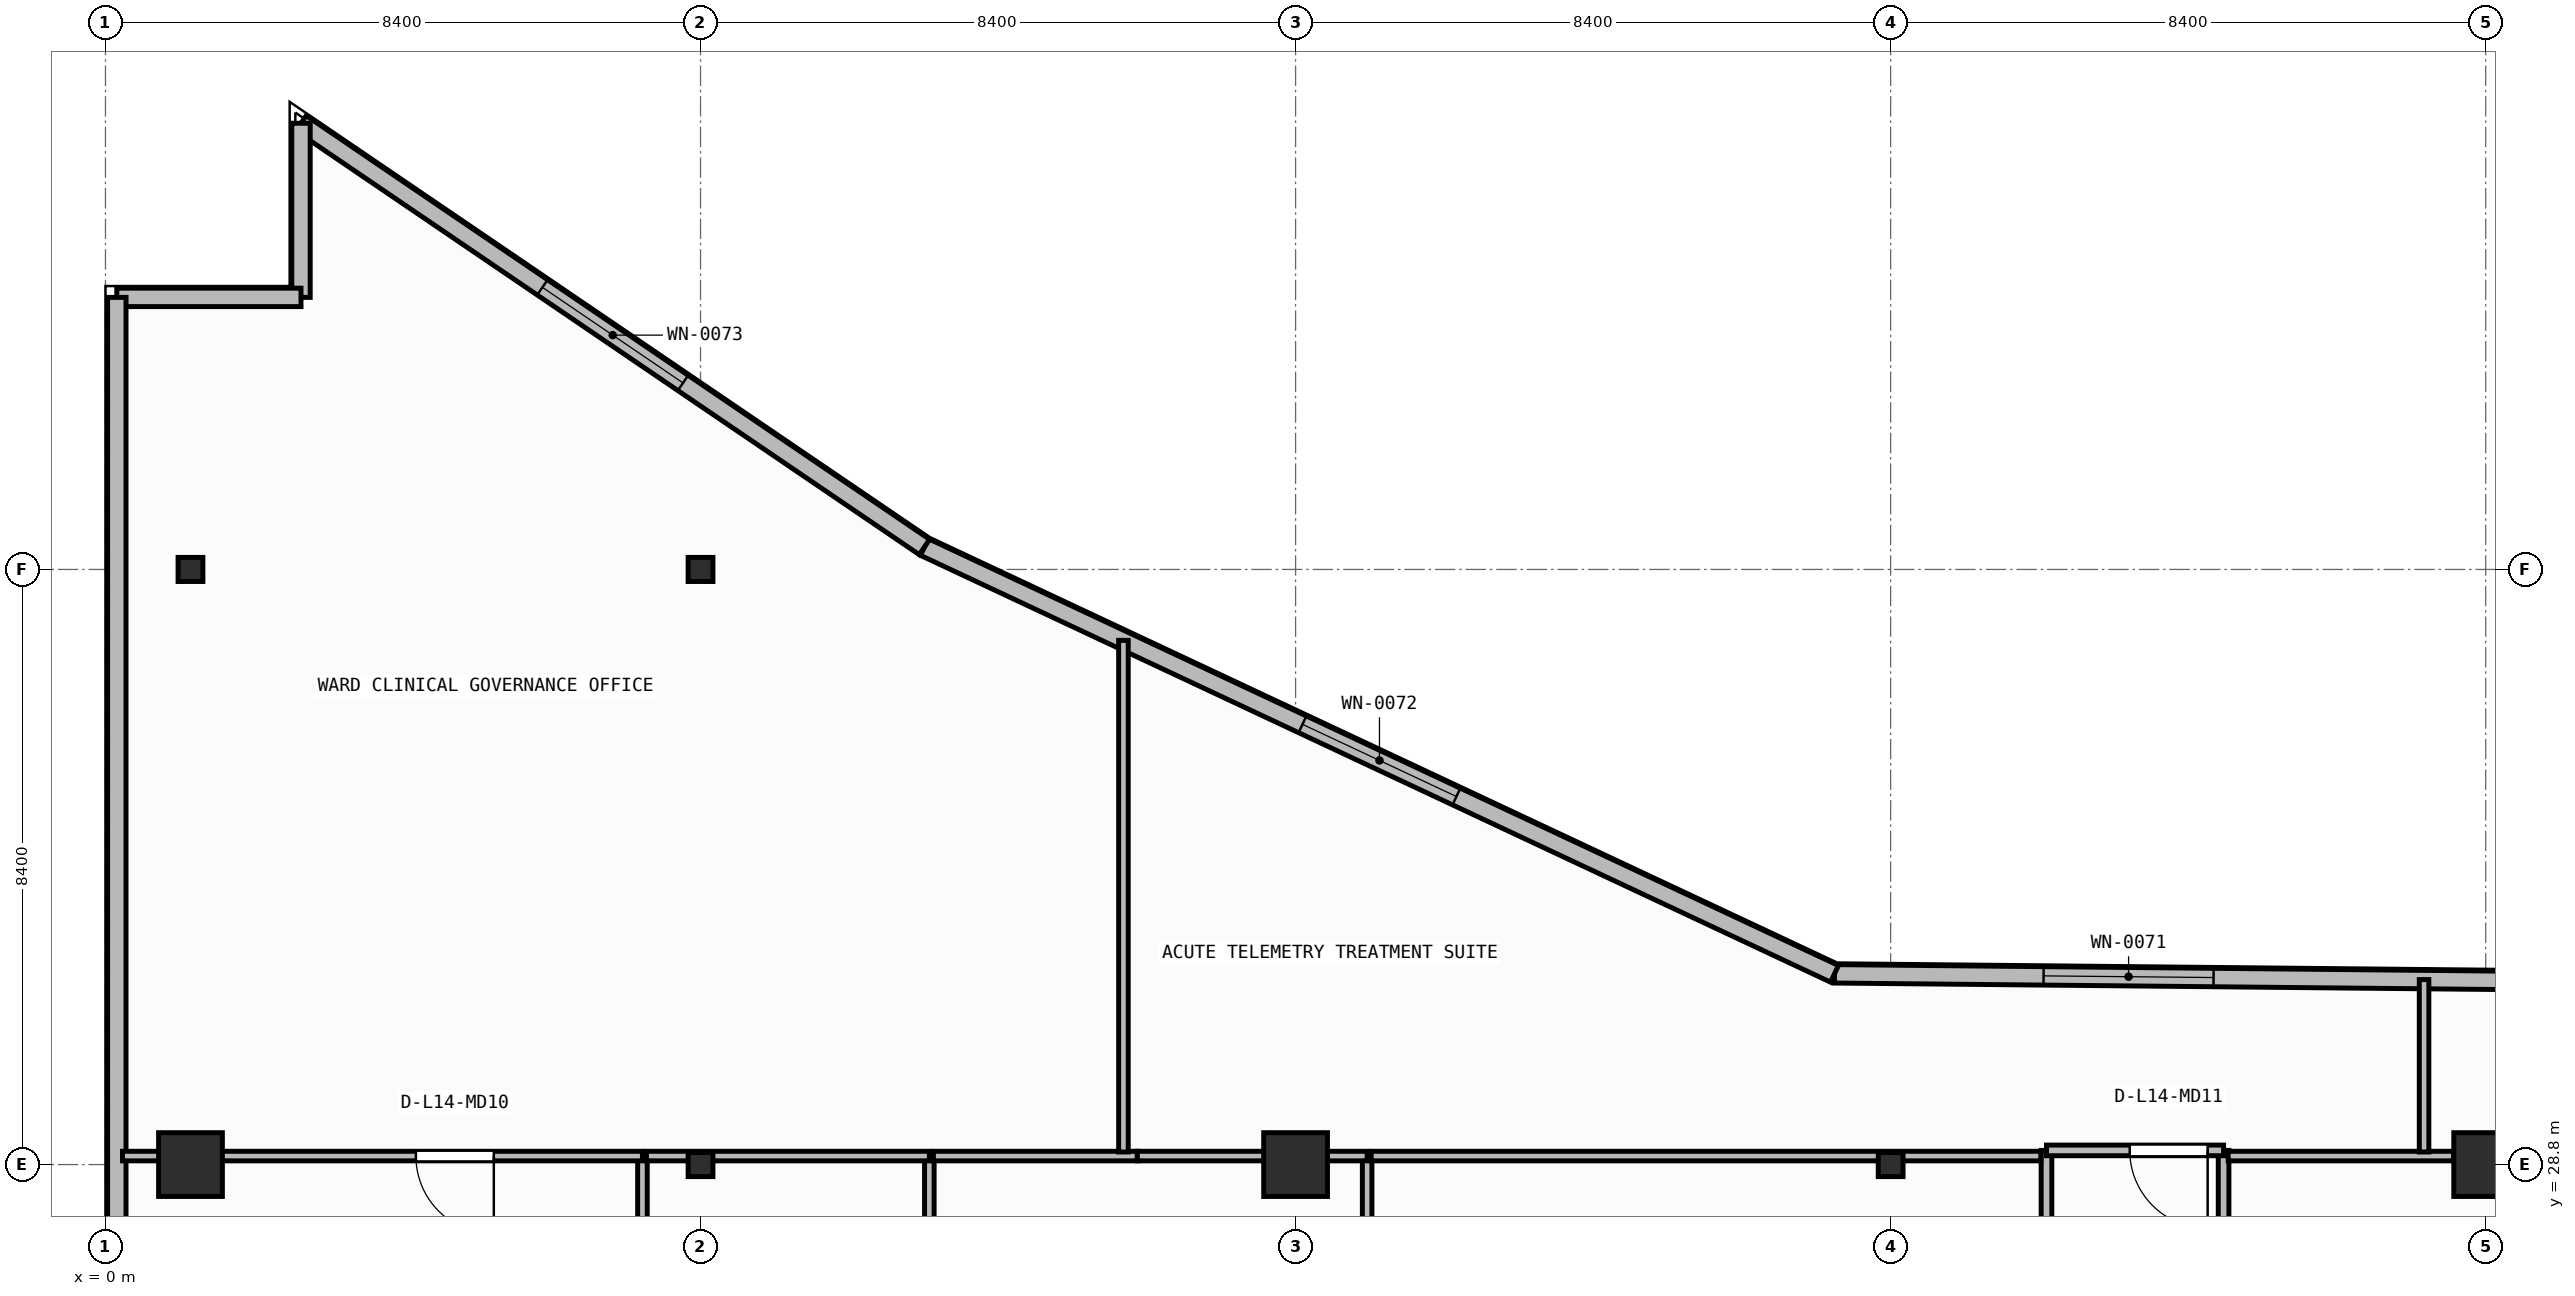
"""IFC4 building model, lengths in metres.
Left out: names, types, materials, properties, quantities, classifications, styles, units other than length and angle.
Written with IfcOpenShell. Run it as: python <this file> out.ifc"""

import sys

from ifc_helpers import new_model, si_unit, direction, frame, frame_2d, origin, origin_2d, place, context, subcontext, project, spatial, rectangle, i_section, extrude, element, fill, save


model = new_model("IFC4")
c1 = context("Model", 3, precision=1e-05, world=origin(), true_north=direction((0.0, 1.0)))
c2 = subcontext(c1, "Body", "Model", "MODEL_VIEW")
j1 = project(units=[si_unit("LENGTHUNIT", "METRE"), si_unit("PLANEANGLEUNIT", "RADIAN")], contexts=[c1])
p1 = place(None, origin())
s1 = spatial("IfcSite", under=j1, at=p1, CompositionType="ELEMENT")
p2 = place(p1, origin())
s2 = spatial("IfcBuilding", under=s1, at=p2, CompositionType="ELEMENT")
p3 = place(p2, frame((0.0, 0.0, 58.05)))
s3 = spatial("IfcBuildingStorey", under=s2, at=p3, CompositionType="ELEMENT", Elevation=58.05)
p4 = place(p3, frame((1.2, 28.8, 0.0), z_axis=(0.0, 0.0, 1.0), x_axis=(1.0, 0.0, 0.0)))
e1 = element("IfcColumn", 1, at=p4, inside=s3, PredefinedType="COLUMN", context=c2, shape_type="SweptSolid", body=[
    extrude(rectangle(XDim=0.9, YDim=0.9, at=origin_2d()), origin(), (0.0, 0.0, 1.0), 3.95),
])
p5 = place(p3, frame((8.4, 28.8, 0.0), z_axis=(0.0, 0.0, 1.0), x_axis=(1.0, 0.0, 0.0)))
e2 = element("IfcColumn", 2, at=p5, inside=s3, PredefinedType="COLUMN", context=c2, shape_type="SweptSolid", body=[
    extrude(i_section(OverallWidth=0.35, OverallDepth=0.34, WebThickness=0.016, FlangeThickness=0.028, at=origin_2d()), origin(), (0.0, 0.0, 1.0), 3.95),
])
p6 = place(p3, frame((16.8, 28.8, 0.0), z_axis=(0.0, 0.0, 1.0), x_axis=(1.0, 0.0, 0.0)))
e3 = element("IfcColumn", 3, at=p6, inside=s3, PredefinedType="COLUMN", context=c2, shape_type="SweptSolid", body=[
    extrude(rectangle(XDim=0.9, YDim=0.9, at=origin_2d()), origin(), (0.0, 0.0, 1.0), 3.95),
])
p7 = place(p3, frame((25.2, 28.8, 0.0), z_axis=(0.0, 0.0, 1.0), x_axis=(1.0, 0.0, 0.0)))
e4 = element("IfcColumn", 4, at=p7, inside=s3, PredefinedType="COLUMN", context=c2, shape_type="SweptSolid", body=[
    extrude(i_section(OverallWidth=0.35, OverallDepth=0.34, WebThickness=0.016, FlangeThickness=0.028, at=origin_2d()), origin(), (0.0, 0.0, 1.0), 3.95),
])
p8 = place(p3, frame((33.6, 28.8, 0.0), z_axis=(0.0, 0.0, 1.0), x_axis=(1.0, 0.0, 0.0)))
e5 = element("IfcColumn", 5, at=p8, inside=s3, PredefinedType="COLUMN", context=c2, shape_type="SweptSolid", body=[
    extrude(rectangle(XDim=0.9, YDim=0.9, at=origin_2d()), origin(), (0.0, 0.0, 1.0), 3.95),
])
for number, where, z_axis, x_axis in (
    (6, (1.2, 37.2, 0.0), (0.0, 0.0, 1.0), (1.0, 0.0, 0.0)),
    (7, (8.4, 37.2, 0.0), (0.0, 0.0, 1.0), (1.0, 0.0, 0.0)),
):
    element("IfcColumn", number, at=place(p3, frame(where, z_axis=z_axis, x_axis=x_axis)), inside=s3, PredefinedType="COLUMN", context=c2, shape_type="SweptSolid", body=[
        extrude(i_section(OverallWidth=0.35, OverallDepth=0.34, WebThickness=0.016, FlangeThickness=0.028, at=origin_2d()), origin(), (0.0, 0.0, 1.0), 3.95),
    ])
p9 = place(p3, frame((39.59, 31.344, 0.0), z_axis=(0.0, 0.0, 1.0), x_axis=(-0.999952362926, 0.009760731435, 0.0)))
e8 = element("IfcWall", 8, at=p9, inside=s3, PredefinedType="STANDARD", context=c2, shape_type="SweptSolid", body=[
    extrude(rectangle(XDim=15.183, YDim=0.26, at=frame_2d((7.591, 0.0))), origin(), (0.0, 0.0, 1.0), 3.71),
])
p10 = place(p9, frame((9.831, 0.0, 0.9)))
e9 = element("IfcOpeningElement", 9, at=p10, cuts=e8, PredefinedType="OPENING", context=c2, shape_type="SweptSolid", body=[
    extrude(rectangle(XDim=2.4, YDim=1.65, at=frame_2d((1.2, 0.825))), frame((0.0, 0.14, 0.0), z_axis=(0.0, -1.0, 0.0), x_axis=(1.0, 0.0, 0.0)), (0.0, 0.0, 1.0), 0.28),
])
p11 = place(p3, frame((24.408, 31.492, 0.0), z_axis=(0.0, 0.0, 1.0), x_axis=(-0.905396522918, 0.424566998585, 0.0)))
e10 = element("IfcWall", 10, at=p11, inside=s3, PredefinedType="STANDARD", context=c2, shape_type="SweptSolid", body=[
    extrude(rectangle(XDim=14.189, YDim=0.26, at=frame_2d((7.095, 0.0))), origin(), (0.0, 0.0, 1.0), 3.71),
])
p12 = place(p11, frame((5.895, 0.0, 0.9)))
e11 = element("IfcOpeningElement", 11, at=p12, cuts=e10, PredefinedType="OPENING", context=c2, shape_type="SweptSolid", body=[
    extrude(rectangle(XDim=2.4, YDim=1.65, at=frame_2d((1.2, 0.825))), frame((0.0, 0.14, 0.0), z_axis=(0.0, -1.0, 0.0), x_axis=(1.0, 0.0, 0.0)), (0.0, 0.0, 1.0), 0.28),
])
p13 = place(p3, frame((11.561, 37.517, 0.0), z_axis=(0.0, 0.0, 1.0), x_axis=(-0.827064743936, 0.562106670782, 0.0)))
e12 = element("IfcWall", 12, at=p13, inside=s3, PredefinedType="STANDARD", context=c2, shape_type="SweptSolid", body=[
    extrude(rectangle(XDim=10.641, YDim=0.26, at=frame_2d((5.32, 0.0))), origin(), (0.0, 0.0, 1.0), 3.71),
])
p14 = place(p13, frame((4.12, 0.0, 0.9)))
e13 = element("IfcOpeningElement", 13, at=p14, cuts=e12, PredefinedType="OPENING", context=c2, shape_type="SweptSolid", body=[
    extrude(rectangle(XDim=2.4, YDim=1.65, at=frame_2d((1.2, 0.825))), frame((0.0, 0.14, 0.0), z_axis=(0.0, -1.0, 0.0), x_axis=(1.0, 0.0, 0.0)), (0.0, 0.0, 1.0), 0.28),
])
p15 = place(p3, frame((2.76, 43.498, 0.0), z_axis=(0.0, 0.0, 1.0), x_axis=(0.0, -1.0, 0.0)))
e14 = element("IfcWall", 14, at=p15, inside=s3, PredefinedType="STANDARD", context=c2, shape_type="SweptSolid", body=[
    extrude(rectangle(XDim=2.458, YDim=0.26, at=frame_2d((1.229, 0.0))), origin(), (0.0, 0.0, 1.0), 3.71),
])
p16 = place(p3, frame((2.76, 41.04, 0.0), z_axis=(0.0, 0.0, 1.0), x_axis=(-1.0, 0.0, 0.0)))
e15 = element("IfcWall", 15, at=p16, inside=s3, PredefinedType="STANDARD", context=c2, shape_type="SweptSolid", body=[
    extrude(rectangle(XDim=2.6, YDim=0.26, at=frame_2d((1.3, 0.0))), origin(), (0.0, 0.0, 1.0), 3.71),
])
p17 = place(p3, frame((0.16, 41.04, 0.0), z_axis=(0.0, 0.0, 1.0), x_axis=(0.0, -1.0, 0.0)))
e16 = element("IfcWall", 16, at=p17, inside=s3, PredefinedType="STANDARD", context=c2, shape_type="SweptSolid", body=[
    extrude(rectangle(XDim=38.28, YDim=0.26, at=frame_2d((19.14, 0.0))), origin(), (0.0, 0.0, 1.0), 3.71),
])
p18 = place(p17, frame((30.187, 0.0, 0.0)))
e17 = element("IfcOpeningElement", 17, at=p18, cuts=e16, PredefinedType="OPENING", context=c2, shape_type="SweptSolid", body=[
    extrude(rectangle(XDim=1.3, YDim=2.15, at=frame_2d((0.65, 1.075))), frame((0.0, 0.14, 0.0), z_axis=(0.0, -1.0, 0.0), x_axis=(1.0, 0.0, 0.0)), (0.0, 0.0, 1.0), 0.28),
])
p19 = place(p17, frame((22.869, 0.0, 0.9)))
e18 = element("IfcOpeningElement", 18, at=p19, cuts=e16, PredefinedType="OPENING", context=c2, shape_type="SweptSolid", body=[
    extrude(rectangle(XDim=2.4, YDim=1.65, at=frame_2d((1.2, 0.825))), frame((0.0, 0.14, 0.0), z_axis=(0.0, -1.0, 0.0), x_axis=(1.0, 0.0, 0.0)), (0.0, 0.0, 1.0), 0.28),
])
p20 = place(p3, frame((27.4, 29.0, 0.0), z_axis=(0.0, 0.0, 1.0), x_axis=(0.0, -1.0, 0.0)))
e19 = element("IfcWall", 19, at=p20, inside=s3, PredefinedType="PARTITIONING", context=c2, shape_type="SweptSolid", body=[
    extrude(rectangle(XDim=9.432, YDim=0.15, at=frame_2d((4.716, 0.0))), origin(), (0.0, 0.0, 1.0), 3.71),
])
p21 = place(p20, frame((3.769, 0.0, 0.0)))
e20 = element("IfcOpeningElement", 20, at=p21, cuts=e19, PredefinedType="OPENING", context=c2, shape_type="SweptSolid", body=[
    extrude(rectangle(XDim=1.1, YDim=2.1, at=frame_2d((0.55, 1.05))), frame((0.0, 0.085, 0.0), z_axis=(0.0, -1.0, 0.0), x_axis=(1.0, 0.0, 0.0)), (0.0, 0.0, 1.0), 0.17),
])
p22 = place(p3, frame((29.9, 19.568, 0.0), z_axis=(0.0, 0.0, 1.0), x_axis=(0.0, 1.0, 0.0)))
e21 = element("IfcWall", 21, at=p22, inside=s3, PredefinedType="PARTITIONING", context=c2, shape_type="SweptSolid", body=[
    extrude(rectangle(XDim=9.432, YDim=0.15, at=frame_2d((4.716, 0.0))), origin(), (0.0, 0.0, 1.0), 3.71),
])
p23 = place(p22, frame((4.166, 0.0, 0.0)))
e22 = element("IfcOpeningElement", 22, at=p23, cuts=e21, PredefinedType="OPENING", context=c2, shape_type="SweptSolid", body=[
    extrude(rectangle(XDim=1.1, YDim=2.1, at=frame_2d((0.55, 1.05))), frame((0.0, 0.085, 0.0), z_axis=(0.0, -1.0, 0.0), x_axis=(1.0, 0.0, 0.0)), (0.0, 0.0, 1.0), 0.17),
])
p24 = place(p3, frame((29.9, 29.0, 0.0), z_axis=(0.0, 0.0, 1.0), x_axis=(-1.0, 0.0, 0.0)))
e23 = element("IfcWall", 23, at=p24, inside=s3, PredefinedType="PARTITIONING", context=c2, shape_type="SweptSolid", body=[
    extrude(rectangle(XDim=2.5, YDim=0.15, at=frame_2d((1.25, 0.0))), origin(), (0.0, 0.0, 1.0), 3.279),
])
p25 = place(p24, frame((0.225, 0.0, 0.0)))
e24 = element("IfcOpeningElement", 24, at=p25, cuts=e23, PredefinedType="OPENING", context=c2, shape_type="SweptSolid", body=[
    extrude(rectangle(XDim=1.1, YDim=2.1, at=frame_2d((0.55, 1.05))), frame((0.0, 0.085, 0.0), z_axis=(0.0, -1.0, 0.0), x_axis=(1.0, 0.0, 0.0)), (0.0, 0.0, 1.0), 0.17),
])
p26 = place(p3, frame((7.58, 19.397, 0.0), z_axis=(0.0, 0.0, 1.0), x_axis=(0.0, 1.0, 0.0)))
e25 = element("IfcWall", 25, at=p26, inside=s3, PredefinedType="PARTITIONING", context=c2, shape_type="SweptSolid", body=[
    extrude(rectangle(XDim=9.522, YDim=0.135, at=frame_2d((4.761, 0.0))), origin(), (0.0, 0.0, 1.0), 3.71),
])
p27 = place(p26, frame((4.612, 0.0, 0.0)))
e26 = element("IfcOpeningElement", 26, at=p27, cuts=e25, PredefinedType="OPENING", context=c2, shape_type="SweptSolid", body=[
    extrude(rectangle(XDim=1.1, YDim=2.1, at=frame_2d((0.55, 1.05))), frame((0.0, 0.077, 0.0), z_axis=(0.0, -1.0, 0.0), x_axis=(1.0, 0.0, 0.0)), (0.0, 0.0, 1.0), 0.155),
])
p28 = place(p3, frame((7.58, 28.92, 0.0), z_axis=(0.0, 0.0, 1.0), x_axis=(-1.0, 0.0, 0.0)))
e27 = element("IfcWall", 27, at=p28, inside=s3, PredefinedType="PARTITIONING", context=c2, shape_type="SweptSolid", body=[
    extrude(rectangle(XDim=7.34, YDim=0.135, at=frame_2d((3.67, 0.0))), origin(), (0.0, 0.0, 1.0), 3.073),
])
p29 = place(p28, frame((2.098, 0.0, 0.0)))
e28 = element("IfcOpeningElement", 28, at=p29, cuts=e27, PredefinedType="OPENING", context=c2, shape_type="SweptSolid", body=[
    extrude(rectangle(XDim=1.1, YDim=2.1, at=frame_2d((0.55, 1.05))), frame((0.0, 0.077, 0.0), z_axis=(0.0, -1.0, 0.0), x_axis=(1.0, 0.0, 0.0)), (0.0, 0.0, 1.0), 0.155),
])
p30 = place(p3, frame((11.63, 19.397, 0.0), z_axis=(0.0, 0.0, 1.0), x_axis=(0.0, 1.0, 0.0)))
e29 = element("IfcWall", 29, at=p30, inside=s3, PredefinedType="PARTITIONING", context=c2, shape_type="SweptSolid", body=[
    extrude(rectangle(XDim=9.522, YDim=0.135, at=frame_2d((4.761, 0.0))), origin(), (0.0, 0.0, 1.0), 3.71),
])
p31 = place(p3, frame((11.63, 28.92, 0.0), z_axis=(0.0, 0.0, 1.0), x_axis=(-1.0, 0.0, 0.0)))
e30 = element("IfcWall", 30, at=p31, inside=s3, PredefinedType="PARTITIONING", context=c2, shape_type="SweptSolid", body=[
    extrude(rectangle(XDim=3.992, YDim=0.135, at=frame_2d((1.996, 0.0))), origin(), (0.0, 0.0, 1.0), 3.073),
])
p32 = place(p3, frame((17.81, 19.397, 0.0), z_axis=(0.0, 0.0, 1.0), x_axis=(0.0, 1.0, 0.0)))
e31 = element("IfcWall", 31, at=p32, inside=s3, PredefinedType="PARTITIONING", context=c2, shape_type="SweptSolid", body=[
    extrude(rectangle(XDim=9.522, YDim=0.135, at=frame_2d((4.761, 0.0))), origin(), (0.0, 0.0, 1.0), 3.71),
])
p33 = place(p3, frame((14.565, 28.92, 0.0), z_axis=(0.0, 0.0, 1.0), x_axis=(-1.0, 0.0, 0.0)))
e32 = element("IfcWall", 32, at=p33, inside=s3, PredefinedType="PARTITIONING", context=c2, shape_type="SweptSolid", body=[
    extrude(rectangle(XDim=2.877, YDim=0.135, at=frame_2d((1.438, 0.0))), origin(), (0.0, 0.0, 1.0), 3.073),
])
p34 = place(p3, frame((17.81, 28.92, 0.0), z_axis=(0.0, 0.0, 1.0), x_axis=(-1.0, 0.0, 0.0)))
e33 = element("IfcWall", 33, at=p34, inside=s3, PredefinedType="PARTITIONING", context=c2, shape_type="SweptSolid", body=[
    extrude(rectangle(XDim=3.243, YDim=0.135, at=frame_2d((1.622, 0.0))), origin(), (0.0, 0.0, 1.0), 3.073),
])
p35 = place(p3, frame((27.32, 28.92, 0.0), z_axis=(0.0, 0.0, 1.0), x_axis=(-1.0, 0.0, 0.0)))
e34 = element("IfcWall", 34, at=p35, inside=s3, PredefinedType="PARTITIONING", context=c2, shape_type="SweptSolid", body=[
    extrude(rectangle(XDim=9.453, YDim=0.135, at=frame_2d((4.726, 0.0))), origin(), (0.0, 0.0, 1.0), 3.073),
])
p36 = place(p3, frame((33.15, 28.92, 0.0), z_axis=(0.0, 0.0, 1.0), x_axis=(-1.0, 0.0, 0.0)))
e35 = element("IfcWall", 35, at=p36, inside=s3, PredefinedType="PARTITIONING", context=c2, shape_type="SweptSolid", body=[
    extrude(rectangle(XDim=3.185, YDim=0.135, at=frame_2d((1.592, 0.0))), origin(), (0.0, 0.0, 1.0), 3.279),
])
p37 = place(p3, frame((38.01, 28.92, 0.0), z_axis=(0.0, 0.0, 1.0), x_axis=(-1.0, 0.0, 0.0)))
e36 = element("IfcWall", 36, at=p37, inside=s3, PredefinedType="PARTITIONING", context=c2, shape_type="SweptSolid", body=[
    extrude(rectangle(XDim=4.858, YDim=0.135, at=frame_2d((2.429, 0.0))), origin(), (0.0, 0.0, 1.0), 3.279),
])
p38 = place(p37, frame((0.284, 0.0, 0.0)))
e37 = element("IfcOpeningElement", 37, at=p38, cuts=e36, PredefinedType="OPENING", context=c2, shape_type="SweptSolid", body=[
    extrude(rectangle(XDim=1.1, YDim=2.1, at=frame_2d((0.55, 1.05))), frame((0.0, 0.077, 0.0), z_axis=(0.0, -1.0, 0.0), x_axis=(1.0, 0.0, 0.0)), (0.0, 0.0, 1.0), 0.155),
])
p39 = place(p3, frame((14.37, 28.978, 0.0), z_axis=(0.0, 0.0, 1.0), x_axis=(0.0, 1.0, 0.0)))
e38 = element("IfcWall", 38, at=p39, inside=s3, PredefinedType="PARTITIONING", context=c2, shape_type="SweptSolid", body=[
    extrude(rectangle(XDim=7.222, YDim=0.135, at=frame_2d((3.611, 0.0))), origin(), (0.0, 0.0, 1.0), 3.71),
])
p40 = place(p3, frame((32.73, 28.978, 0.0), z_axis=(0.0, 0.0, 1.0), x_axis=(0.0, 1.0, 0.0)))
e39 = element("IfcWall", 39, at=p40, inside=s3, PredefinedType="PARTITIONING", context=c2, shape_type="SweptSolid", body=[
    extrude(rectangle(XDim=2.433, YDim=0.135, at=frame_2d((1.217, 0.0))), origin(), (0.0, 0.0, 1.0), 3.71),
])
p41 = place(p10, origin())
e40 = element("IfcWindow", 40, at=p41, inside=s3, PartitioningType="SINGLE_PANEL", PredefinedType="WINDOW", context=c2, shape_type="SweptSolid", body=[
    extrude(rectangle(XDim=2.4, YDim=1.65, at=frame_2d((1.2, 0.825))), frame((0.0, 0.03, 0.0), z_axis=(0.0, -1.0, 0.0), x_axis=(1.0, 0.0, 0.0)), (0.0, 0.0, 1.0), 0.06),
])
fill(e9, e40)
p42 = place(p12, origin())
e41 = element("IfcWindow", 41, at=p42, inside=s3, PartitioningType="SINGLE_PANEL", PredefinedType="WINDOW", context=c2, shape_type="SweptSolid", body=[
    extrude(rectangle(XDim=2.4, YDim=1.65, at=frame_2d((1.2, 0.825))), frame((0.0, 0.03, 0.0), z_axis=(0.0, -1.0, 0.0), x_axis=(1.0, 0.0, 0.0)), (0.0, 0.0, 1.0), 0.06),
])
fill(e11, e41)
p43 = place(p14, origin())
e42 = element("IfcWindow", 42, at=p43, inside=s3, PartitioningType="SINGLE_PANEL", PredefinedType="WINDOW", context=c2, shape_type="SweptSolid", body=[
    extrude(rectangle(XDim=2.4, YDim=1.65, at=frame_2d((1.2, 0.825))), frame((0.0, 0.03, 0.0), z_axis=(0.0, -1.0, 0.0), x_axis=(1.0, 0.0, 0.0)), (0.0, 0.0, 1.0), 0.06),
])
fill(e13, e42)
p44 = place(p25, origin())
e43 = element("IfcDoor", 43, at=p44, inside=s3, OperationType="SINGLE_SWING_LEFT", PredefinedType="DOOR", context=c2, shape_type="SweptSolid", body=[
    extrude(rectangle(XDim=1.1, YDim=2.1, at=frame_2d((0.55, 1.05))), frame((0.0, 0.025, 0.0), z_axis=(0.0, -1.0, 0.0), x_axis=(1.0, 0.0, 0.0)), (0.0, 0.0, 1.0), 0.05),
])
fill(e24, e43)
p45 = place(p29, origin())
e44 = element("IfcDoor", 44, at=p45, inside=s3, OperationType="SINGLE_SWING_LEFT", PredefinedType="DOOR", context=c2, shape_type="SweptSolid", body=[
    extrude(rectangle(XDim=1.1, YDim=2.1, at=frame_2d((0.55, 1.05))), frame((0.0, 0.025, 0.0), z_axis=(0.0, -1.0, 0.0), x_axis=(1.0, 0.0, 0.0)), (0.0, 0.0, 1.0), 0.05),
])
fill(e28, e44)
save(model, sys.argv[1])
